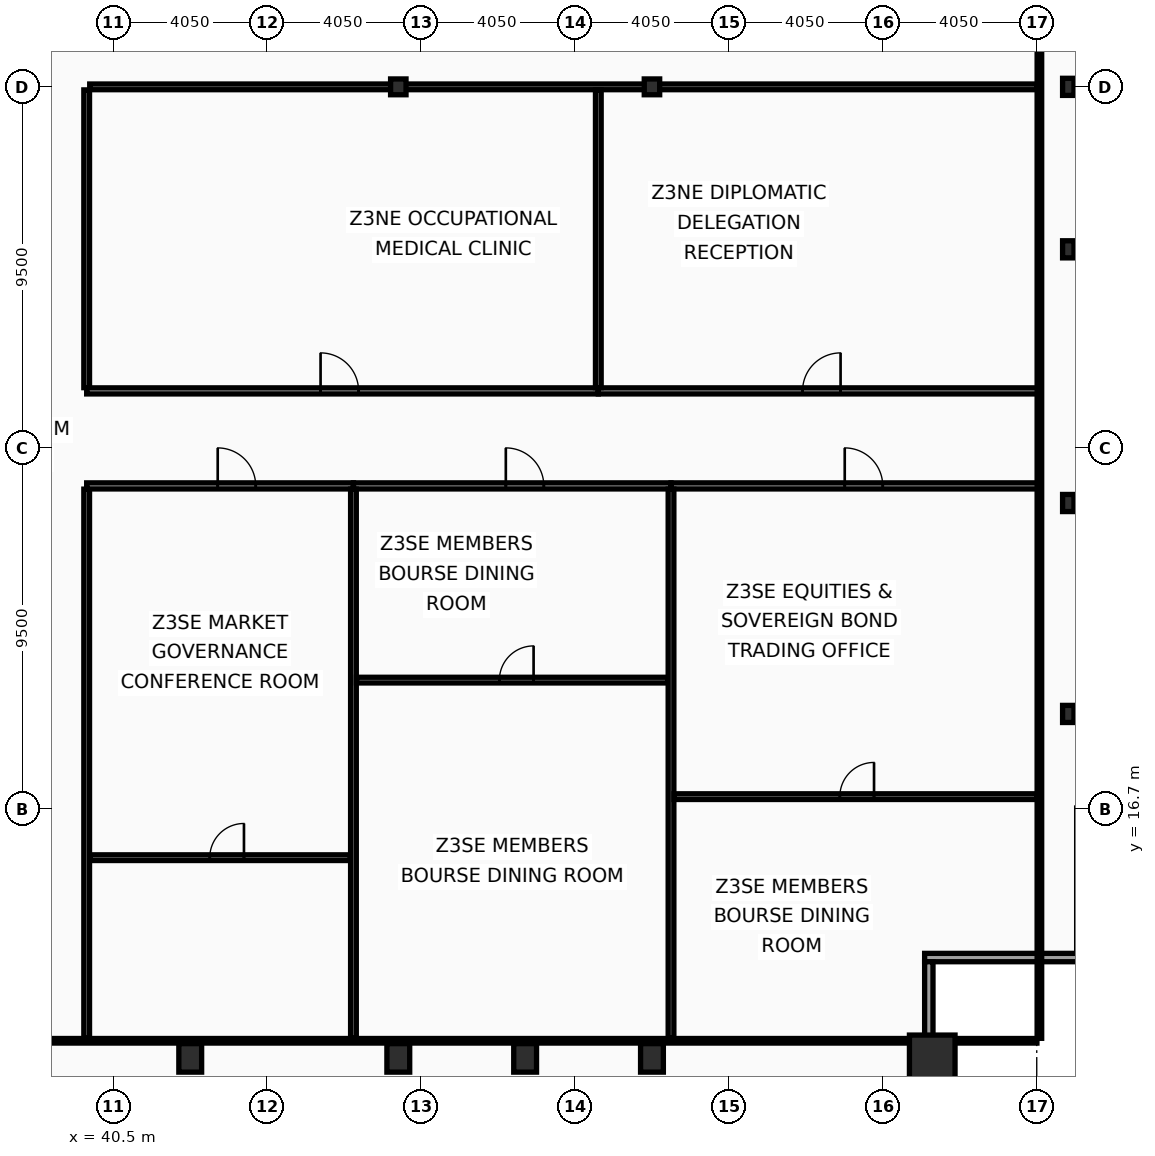
"""IFC4 building model, lengths in metres.
Left out: names, types, materials, properties, quantities, classifications, styles, units other than length and angle.
Written with IfcOpenShell. Run it as: python <this file> out.ifc"""

import sys

from ifc_helpers import new_model, si_unit, direction, frame, frame_2d, origin, origin_2d, place, context, subcontext, project, spatial, rectangle, hollow_rectangle, i_section, extrude, element, fill, save


model = new_model("IFC4")
c1 = context("Model", 3, precision=1e-05, world=origin(), true_north=direction((0.0, 1.0)))
c2 = subcontext(c1, "Body", "Model", "MODEL_VIEW")
j1 = project(units=[si_unit("LENGTHUNIT", "METRE"), si_unit("PLANEANGLEUNIT", "RADIAN")], contexts=[c1])
p1 = place(None, origin())
s1 = spatial("IfcSite", under=j1, at=p1, CompositionType="ELEMENT")
p2 = place(p1, origin())
s2 = spatial("IfcBuilding", under=s1, at=p2, CompositionType="ELEMENT")
p3 = place(p2, frame((0.0, 0.0, 192.2)))
s3 = spatial("IfcBuildingStorey", under=s2, at=p3, CompositionType="ELEMENT", Elevation=192.2)
p4 = place(p3, frame((62.05, 10.15, 0.0), z_axis=(0.0, 0.0, 1.0), x_axis=(1.0, 0.0, 0.0)))
e1 = element("IfcColumn", 1, at=p4, inside=s3, PredefinedType="COLUMN", context=c2, shape_type="SweptSolid", body=[
    extrude(hollow_rectangle(XDim=1.2, YDim=1.2, WallThickness=0.06, at=origin_2d()), origin(), (0.0, 0.0, 1.0), 3.6),
])
for number, where, z_axis, x_axis in (
    (2, (42.525, 10.15, 0.0), (0.0, 0.0, 1.0), (1.0, 0.0, 0.0)),
    (3, (48.0, 10.15, 0.0), (0.0, 0.0, 1.0), (1.0, 0.0, 0.0)),
    (4, (51.337, 10.15, 0.0), (0.0, 0.0, 1.0), (1.0, 0.0, 0.0)),
    (5, (54.675, 10.15, 0.0), (0.0, 0.0, 1.0), (1.0, 0.0, 0.0)),
):
    element("IfcColumn", number, at=place(p3, frame(where, z_axis=z_axis, x_axis=x_axis)), inside=s3, PredefinedType="COLUMN", context=c2, shape_type="SweptSolid", body=[
        extrude(hollow_rectangle(XDim=0.6, YDim=0.75, WallThickness=0.045, at=origin_2d()), origin(), (0.0, 0.0, 1.0), 3.6),
    ])
for number, where, z_axis, x_axis in (
    (6, (65.63, 19.2, 0.0), (0.0, 0.0, 1.0), (1.0, 0.0, 0.0)),
    (7, (65.63, 24.75, 0.0), (0.0, 0.0, 1.0), (1.0, 0.0, 0.0)),
    (8, (65.63, 31.425, 0.0), (0.0, 0.0, 1.0), (1.0, 0.0, 0.0)),
    (9, (65.63, 35.7, 0.0), (0.0, 0.0, 1.0), (1.0, 0.0, 0.0)),
):
    element("IfcColumn", number, at=place(p3, frame(where, z_axis=z_axis, x_axis=x_axis)), inside=s3, PredefinedType="COLUMN", context=c2, shape_type="SweptSolid", body=[
        extrude(i_section(OverallWidth=0.3, OverallDepth=0.45, WebThickness=0.014, FlangeThickness=0.026, at=origin_2d()), origin(), (0.0, 0.0, 1.0), 3.6),
    ])
for number, where, z_axis, x_axis in (
    (10, (48.0, 35.7, 0.0), (0.0, 0.0, 1.0), (1.0, 0.0, 0.0)),
    (11, (54.675, 35.7, 0.0), (0.0, 0.0, 1.0), (1.0, 0.0, 0.0)),
):
    element("IfcColumn", number, at=place(p3, frame(where, z_axis=z_axis, x_axis=x_axis)), inside=s3, PredefinedType="COLUMN", context=c2, shape_type="SweptSolid", body=[
        extrude(i_section(OverallWidth=0.406, OverallDepth=0.416, WebThickness=0.03, FlangeThickness=0.048, at=origin_2d()), origin(), (0.0, 0.0, 1.0), 3.6),
    ])
p5 = place(p3, frame((66.07, 12.79, 0.0), z_axis=(0.0, 0.0, 1.0), x_axis=(-1.0, 0.0, 0.0)))
e12 = element("IfcWall", 12, at=p5, inside=s3, PredefinedType="SOLIDWALL", context=c2, shape_type="SweptSolid", body=[
    extrude(rectangle(XDim=4.22, YDim=0.22, at=frame_2d((2.11, 0.0))), origin(), (0.0, 0.0, 1.0), 2.83),
])
p6 = place(p3, frame((61.96, 12.68, 0.0), z_axis=(0.0, 0.0, 1.0), x_axis=(0.0, -1.0, 0.0)))
e13 = element("IfcWall", 13, at=p6, inside=s3, PredefinedType="SOLIDWALL", context=c2, shape_type="SweptSolid", body=[
    extrude(rectangle(XDim=3.91, YDim=0.22, at=frame_2d((1.955, 0.0))), origin(), (0.0, 0.0, 1.0), 2.83),
])
p7 = place(p3, frame((39.8, 10.665, 0.0), z_axis=(0.0, 0.0, 1.0), x_axis=(0.0, 1.0, 0.0)))
e14 = element("IfcWall", 14, at=p7, inside=s3, PredefinedType="PARTITIONING", context=c2, shape_type="SweptSolid", body=[
    extrude(rectangle(XDim=14.45, YDim=0.15, at=frame_2d((7.225, 0.0))), origin(), (0.0, 0.0, 1.0), 2.98),
])
p8 = place(p3, frame((39.8, 27.785, 0.0), z_axis=(0.0, 0.0, 1.0), x_axis=(0.0, 1.0, 0.0)))
e15 = element("IfcWall", 15, at=p8, inside=s3, PredefinedType="PARTITIONING", context=c2, shape_type="SweptSolid", body=[
    extrude(rectangle(XDim=7.835, YDim=0.15, at=frame_2d((3.917, 0.0))), origin(), (0.0, 0.0, 1.0), 2.98),
])
p9 = place(p3, frame((39.88, 35.7, 0.0), z_axis=(0.0, 0.0, 1.0), x_axis=(1.0, 0.0, 0.0)))
e16 = element("IfcWall", 16, at=p9, inside=s3, PredefinedType="PARTITIONING", context=c2, shape_type="SweptSolid", body=[
    extrude(rectangle(XDim=24.925, YDim=0.15, at=frame_2d((12.462, 0.0))), origin(), (0.0, 0.0, 1.0), 2.73),
])
p10 = place(p3, frame((39.8, 25.2, 0.0), z_axis=(0.0, 0.0, 1.0), x_axis=(1.0, 0.0, 0.0)))
e17 = element("IfcWall", 17, at=p10, inside=s3, PredefinedType="PARTITIONING", context=c2, shape_type="SweptSolid", body=[
    extrude(rectangle(XDim=7.02, YDim=0.16, at=frame_2d((3.51, 0.0))), origin(), (0.0, 0.0, 1.0), 2.73),
])
p11 = place(p10, frame((3.448, 0.0, 0.0)))
e18 = element("IfcOpeningElement", 18, at=p11, cuts=e17, PredefinedType="OPENING", context=c2, shape_type="SweptSolid", body=[
    extrude(rectangle(XDim=1.0, YDim=2.05, at=frame_2d((0.5, 1.025))), frame((0.0, 0.09, 0.0), z_axis=(0.0, -1.0, 0.0), x_axis=(1.0, 0.0, 0.0)), (0.0, 0.0, 1.0), 0.18),
])
p12 = place(p3, frame((39.88, 15.418, 0.0), z_axis=(0.0, 0.0, 1.0), x_axis=(1.0, 0.0, 0.0)))
e19 = element("IfcWall", 19, at=p12, inside=s3, PredefinedType="PARTITIONING", context=c2, shape_type="SweptSolid", body=[
    extrude(rectangle(XDim=6.86, YDim=0.15, at=frame_2d((3.43, 0.0))), origin(), (0.0, 0.0, 1.0), 2.73),
])
p13 = place(p12, frame((3.159, 0.0, 0.0)))
e20 = element("IfcOpeningElement", 20, at=p13, cuts=e19, PredefinedType="OPENING", context=c2, shape_type="SweptSolid", body=[
    extrude(rectangle(XDim=0.9, YDim=2.05, at=frame_2d((0.45, 1.025))), frame((0.0, 0.085, 0.0), z_axis=(0.0, -1.0, 0.0), x_axis=(1.0, 0.0, 0.0)), (0.0, 0.0, 1.0), 0.17),
])
p14 = place(p3, frame((46.82, 25.2, 0.0), z_axis=(0.0, 0.0, 1.0), x_axis=(1.0, 0.0, 0.0)))
e21 = element("IfcWall", 21, at=p14, inside=s3, PredefinedType="PARTITIONING", context=c2, shape_type="SweptSolid", body=[
    extrude(rectangle(XDim=8.357, YDim=0.16, at=frame_2d((4.178, 0.0))), origin(), (0.0, 0.0, 1.0), 2.73),
])
p15 = place(p14, frame((4.01, 0.0, 0.0)))
e22 = element("IfcOpeningElement", 22, at=p15, cuts=e21, PredefinedType="OPENING", context=c2, shape_type="SweptSolid", body=[
    extrude(rectangle(XDim=1.0, YDim=2.05, at=frame_2d((0.5, 1.025))), frame((0.0, 0.09, 0.0), z_axis=(0.0, -1.0, 0.0), x_axis=(1.0, 0.0, 0.0)), (0.0, 0.0, 1.0), 0.18),
])
p16 = place(p3, frame((46.82, 10.665, 0.0), z_axis=(0.0, 0.0, 1.0), x_axis=(0.0, 1.0, 0.0)))
e23 = element("IfcWall", 23, at=p16, inside=s3, PredefinedType="PARTITIONING", context=c2, shape_type="SweptSolid", body=[
    extrude(rectangle(XDim=14.45, YDim=0.15, at=frame_2d((7.225, 0.0))), origin(), (0.0, 0.0, 1.0), 2.98),
])
p17 = place(p3, frame((46.9, 20.09, 0.0), z_axis=(0.0, 0.0, 1.0), x_axis=(1.0, 0.0, 0.0)))
e24 = element("IfcWall", 24, at=p17, inside=s3, PredefinedType="PARTITIONING", context=c2, shape_type="SweptSolid", body=[
    extrude(rectangle(XDim=8.197, YDim=0.15, at=frame_2d((4.098, 0.0))), origin(), (0.0, 0.0, 1.0), 2.73),
])
p18 = place(p17, frame((3.76, 0.0, 0.0)))
e25 = element("IfcOpeningElement", 25, at=p18, cuts=e24, PredefinedType="OPENING", context=c2, shape_type="SweptSolid", body=[
    extrude(rectangle(XDim=0.9, YDim=2.05, at=frame_2d((0.45, 1.025))), frame((0.0, 0.085, 0.0), z_axis=(0.0, -1.0, 0.0), x_axis=(1.0, 0.0, 0.0)), (0.0, 0.0, 1.0), 0.17),
])
p19 = place(p3, frame((55.176, 25.2, 0.0), z_axis=(0.0, 0.0, 1.0), x_axis=(1.0, 0.0, 0.0)))
e26 = element("IfcWall", 26, at=p19, inside=s3, PredefinedType="PARTITIONING", context=c2, shape_type="SweptSolid", body=[
    extrude(rectangle(XDim=9.694, YDim=0.16, at=frame_2d((4.847, 0.0))), origin(), (0.0, 0.0, 1.0), 3.44),
])
p20 = place(p19, frame((4.571, 0.0, 0.0)))
e27 = element("IfcOpeningElement", 27, at=p20, cuts=e26, PredefinedType="OPENING", context=c2, shape_type="SweptSolid", body=[
    extrude(rectangle(XDim=1.0, YDim=2.05, at=frame_2d((0.5, 1.025))), frame((0.0, 0.09, 0.0), z_axis=(0.0, -1.0, 0.0), x_axis=(1.0, 0.0, 0.0)), (0.0, 0.0, 1.0), 0.18),
])
p21 = place(p3, frame((55.176, 10.665, 0.0), z_axis=(0.0, 0.0, 1.0), x_axis=(0.0, 1.0, 0.0)))
e28 = element("IfcWall", 28, at=p21, inside=s3, PredefinedType="PARTITIONING", context=c2, shape_type="SweptSolid", body=[
    extrude(rectangle(XDim=14.45, YDim=0.15, at=frame_2d((7.225, 0.0))), origin(), (0.0, 0.0, 1.0), 2.73),
])
p22 = place(p3, frame((55.256, 17.024, 0.0), z_axis=(0.0, 0.0, 1.0), x_axis=(1.0, 0.0, 0.0)))
e29 = element("IfcWall", 29, at=p22, inside=s3, PredefinedType="PARTITIONING", context=c2, shape_type="SweptSolid", body=[
    extrude(rectangle(XDim=9.549, YDim=0.15, at=frame_2d((4.774, 0.0))), origin(), (0.0, 0.0, 1.0), 2.83),
])
p23 = place(p22, frame((4.362, 0.0, 0.0)))
e30 = element("IfcOpeningElement", 30, at=p23, cuts=e29, PredefinedType="OPENING", context=c2, shape_type="SweptSolid", body=[
    extrude(rectangle(XDim=0.9, YDim=2.05, at=frame_2d((0.45, 1.025))), frame((0.0, 0.085, 0.0), z_axis=(0.0, -1.0, 0.0), x_axis=(1.0, 0.0, 0.0)), (0.0, 0.0, 1.0), 0.17),
])
p24 = place(p3, frame((39.8, 27.7, 0.0), z_axis=(0.0, 0.0, 1.0), x_axis=(1.0, 0.0, 0.0)))
e31 = element("IfcWall", 31, at=p24, inside=s3, PredefinedType="PARTITIONING", context=c2, shape_type="SweptSolid", body=[
    extrude(rectangle(XDim=13.463, YDim=0.16, at=frame_2d((6.732, 0.0))), origin(), (0.0, 0.0, 1.0), 2.73),
])
p25 = place(p24, frame((6.155, 0.0, 0.0)))
e32 = element("IfcOpeningElement", 32, at=p25, cuts=e31, PredefinedType="OPENING", context=c2, shape_type="SweptSolid", body=[
    extrude(rectangle(XDim=1.0, YDim=2.05, at=frame_2d((0.5, 1.025))), frame((0.0, 0.09, 0.0), z_axis=(0.0, -1.0, 0.0), x_axis=(1.0, 0.0, 0.0)), (0.0, 0.0, 1.0), 0.18),
])
p26 = place(p3, frame((53.263, 27.7, 0.0), z_axis=(0.0, 0.0, 1.0), x_axis=(1.0, 0.0, 0.0)))
e33 = element("IfcWall", 33, at=p26, inside=s3, PredefinedType="PARTITIONING", context=c2, shape_type="SweptSolid", body=[
    extrude(rectangle(XDim=11.607, YDim=0.16, at=frame_2d((5.803, 0.0))), origin(), (0.0, 0.0, 1.0), 2.73),
])
p27 = place(p26, frame((5.375, 0.0, 0.0)))
e34 = element("IfcOpeningElement", 34, at=p27, cuts=e33, PredefinedType="OPENING", context=c2, shape_type="SweptSolid", body=[
    extrude(rectangle(XDim=1.0, YDim=2.05, at=frame_2d((0.5, 1.025))), frame((0.0, 0.09, 0.0), z_axis=(0.0, -1.0, 0.0), x_axis=(1.0, 0.0, 0.0)), (0.0, 0.0, 1.0), 0.18),
])
p28 = place(p3, frame((53.263, 27.785, 0.0), z_axis=(0.0, 0.0, 1.0), x_axis=(0.0, 1.0, 0.0)))
e35 = element("IfcWall", 35, at=p28, inside=s3, PredefinedType="PARTITIONING", context=c2, shape_type="SweptSolid", body=[
    extrude(rectangle(XDim=7.835, YDim=0.15, at=frame_2d((3.917, 0.0))), origin(), (0.0, 0.0, 1.0), 2.98),
])
p29 = place(p3, frame((64.87, 10.665, 0.0), z_axis=(0.0, 0.0, 1.0), x_axis=(0.0, 1.0, 0.0)))
e36 = element("IfcWall", 36, at=p29, inside=s3, PredefinedType="PARTITIONING", context=c2, shape_type="SweptSolid", body=[
    extrude(rectangle(XDim=42.11, YDim=0.12, at=frame_2d((21.055, 0.0))), origin(), (0.0, 0.0, 1.0), 2.73),
])
p30 = place(p3, frame((8.095, 10.6, 0.0), z_axis=(0.0, 0.0, 1.0), x_axis=(1.0, 0.0, 0.0)))
e37 = element("IfcWall", 37, at=p30, inside=s3, PredefinedType="PARTITIONING", context=c2, shape_type="SweptSolid", body=[
    extrude(rectangle(XDim=56.71, YDim=0.12, at=frame_2d((28.355, 0.0))), origin(), (0.0, 0.0, 1.0), 2.73),
])
p31 = place(p11, origin())
e38 = element("IfcDoor", 38, at=p31, inside=s3, OperationType="SINGLE_SWING_LEFT", PredefinedType="DOOR", context=c2, shape_type="SweptSolid", body=[
    extrude(rectangle(XDim=1.0, YDim=2.05, at=frame_2d((0.5, 1.025))), frame((0.0, 0.025, 0.0), z_axis=(0.0, -1.0, 0.0), x_axis=(1.0, 0.0, 0.0)), (0.0, 0.0, 1.0), 0.05),
])
fill(e18, e38)
p32 = place(p13, origin())
e39 = element("IfcDoor", 39, at=p32, inside=s3, OperationType="SINGLE_SWING_RIGHT", PredefinedType="DOOR", context=c2, shape_type="SweptSolid", body=[
    extrude(rectangle(XDim=0.9, YDim=2.05, at=frame_2d((0.45, 1.025))), frame((0.0, 0.025, 0.0), z_axis=(0.0, -1.0, 0.0), x_axis=(1.0, 0.0, 0.0)), (0.0, 0.0, 1.0), 0.05),
])
fill(e20, e39)
p33 = place(p15, origin())
e40 = element("IfcDoor", 40, at=p33, inside=s3, OperationType="SINGLE_SWING_LEFT", PredefinedType="DOOR", context=c2, shape_type="SweptSolid", body=[
    extrude(rectangle(XDim=1.0, YDim=2.05, at=frame_2d((0.5, 1.025))), frame((0.0, 0.025, 0.0), z_axis=(0.0, -1.0, 0.0), x_axis=(1.0, 0.0, 0.0)), (0.0, 0.0, 1.0), 0.05),
])
fill(e22, e40)
p34 = place(p18, origin())
e41 = element("IfcDoor", 41, at=p34, inside=s3, OperationType="SINGLE_SWING_RIGHT", PredefinedType="DOOR", context=c2, shape_type="SweptSolid", body=[
    extrude(rectangle(XDim=0.9, YDim=2.05, at=frame_2d((0.45, 1.025))), frame((0.0, 0.025, 0.0), z_axis=(0.0, -1.0, 0.0), x_axis=(1.0, 0.0, 0.0)), (0.0, 0.0, 1.0), 0.05),
])
fill(e25, e41)
p35 = place(p20, origin())
e42 = element("IfcDoor", 42, at=p35, inside=s3, OperationType="SINGLE_SWING_LEFT", PredefinedType="DOOR", context=c2, shape_type="SweptSolid", body=[
    extrude(rectangle(XDim=1.0, YDim=2.05, at=frame_2d((0.5, 1.025))), frame((0.0, 0.025, 0.0), z_axis=(0.0, -1.0, 0.0), x_axis=(1.0, 0.0, 0.0)), (0.0, 0.0, 1.0), 0.05),
])
fill(e27, e42)
p36 = place(p23, origin())
e43 = element("IfcDoor", 43, at=p36, inside=s3, OperationType="SINGLE_SWING_RIGHT", PredefinedType="DOOR", context=c2, shape_type="SweptSolid", body=[
    extrude(rectangle(XDim=0.9, YDim=2.05, at=frame_2d((0.45, 1.025))), frame((0.0, 0.025, 0.0), z_axis=(0.0, -1.0, 0.0), x_axis=(1.0, 0.0, 0.0)), (0.0, 0.0, 1.0), 0.05),
])
fill(e30, e43)
p37 = place(p25, origin())
e44 = element("IfcDoor", 44, at=p37, inside=s3, OperationType="SINGLE_SWING_LEFT", PredefinedType="DOOR", context=c2, shape_type="SweptSolid", body=[
    extrude(rectangle(XDim=1.0, YDim=2.05, at=frame_2d((0.5, 1.025))), frame((0.0, 0.025, 0.0), z_axis=(0.0, -1.0, 0.0), x_axis=(1.0, 0.0, 0.0)), (0.0, 0.0, 1.0), 0.05),
])
fill(e32, e44)
p38 = place(p27, origin())
e45 = element("IfcDoor", 45, at=p38, inside=s3, OperationType="SINGLE_SWING_RIGHT", PredefinedType="DOOR", context=c2, shape_type="SweptSolid", body=[
    extrude(rectangle(XDim=1.0, YDim=2.05, at=frame_2d((0.5, 1.025))), frame((0.0, 0.025, 0.0), z_axis=(0.0, -1.0, 0.0), x_axis=(1.0, 0.0, 0.0)), (0.0, 0.0, 1.0), 0.05),
])
fill(e34, e45)
save(model, sys.argv[1])
